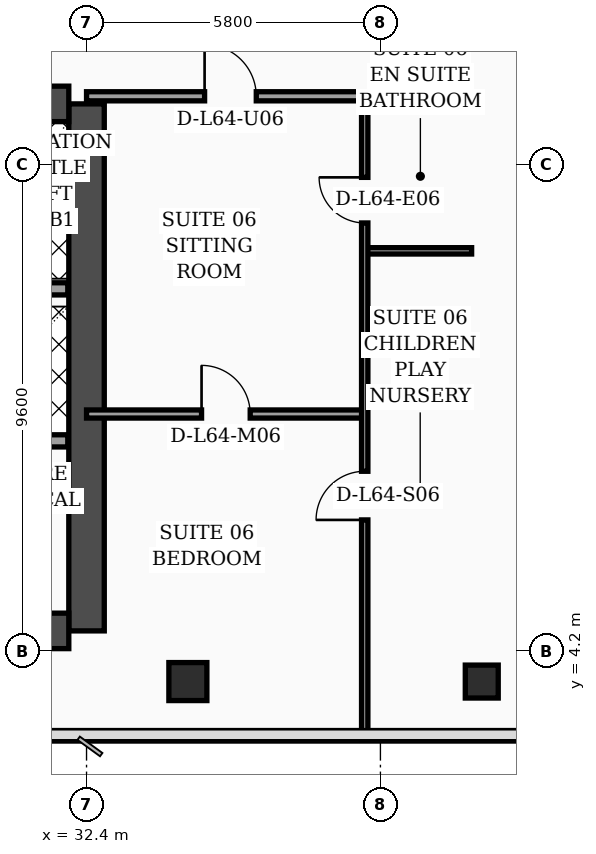
"""IFC4 building model, lengths in metres.
Left out: names, types, materials, properties, quantities, classifications, styles, units other than length and angle.
Written with IfcOpenShell. Run it as: python <this file> out.ifc"""

import sys

from ifc_helpers import new_model, si_unit, direction, frame, frame_2d, origin, origin_2d, place, context, subcontext, project, spatial, rectangle, hollow_rectangle, extrude, element, fill, save


model = new_model("IFC4")
c1 = context("Model", 3, precision=1e-05, world=origin(), true_north=direction((0.0, 1.0)))
c2 = subcontext(c1, "Body", "Model", "MODEL_VIEW")
j1 = project(units=[si_unit("LENGTHUNIT", "METRE"), si_unit("PLANEANGLEUNIT", "RADIAN")], contexts=[c1])
p1 = place(None, origin())
s1 = spatial("IfcSite", under=j1, at=p1, CompositionType="ELEMENT")
p2 = place(p1, origin())
s2 = spatial("IfcBuilding", under=s1, at=p2, CompositionType="ELEMENT")
p3 = place(p2, frame((0.0, 0.0, 259.0)))
s3 = spatial("IfcBuildingStorey", under=s2, at=p3, CompositionType="ELEMENT", Elevation=259.0)
p4 = place(p3, frame((32.4, 4.6, 0.0), z_axis=(0.0, 0.0, 1.0), x_axis=(0.0, 1.0, 0.0)))
e1 = element("IfcWall", 1, at=p4, inside=s3, PredefinedType="SHEAR", context=c2, shape_type="SweptSolid", body=[
    extrude(rectangle(XDim=10.4, YDim=0.7, at=frame_2d((5.2, 0.0))), origin(), (0.0, 0.0, 1.0), 4.05),
])
p5 = place(p3, frame((21.95, 15.0, 0.0), z_axis=(0.0, 0.0, 1.0), x_axis=(1.0, 0.0, 0.0)))
e2 = element("IfcWall", 2, at=p5, inside=s3, PredefinedType="SHEAR", context=c2, shape_type="SweptSolid", body=[
    extrude(rectangle(XDim=10.1, YDim=0.7, at=frame_2d((5.05, 0.0))), origin(), (0.0, 0.0, 1.0), 4.05),
])
p6 = place(p5, frame((4.95, 0.0, 0.0)))
e3 = element("IfcOpeningElement", 3, at=p6, cuts=e2, PredefinedType="OPENING", context=c2, shape_type="SweptSolid", body=[
    extrude(rectangle(XDim=1.1, YDim=2.2, at=frame_2d((0.55, 1.1))), frame((0.0, 0.36, 0.0), z_axis=(0.0, -1.0, 0.0), x_axis=(1.0, 0.0, 0.0)), (0.0, 0.0, 1.0), 0.72),
])
p7 = place(p3, frame((21.95, 4.6, 0.0), z_axis=(0.0, 0.0, 1.0), x_axis=(1.0, 0.0, 0.0)))
e4 = element("IfcWall", 4, at=p7, inside=s3, PredefinedType="SHEAR", context=c2, shape_type="SweptSolid", body=[
    extrude(rectangle(XDim=10.1, YDim=0.7, at=frame_2d((5.05, 0.0))), origin(), (0.0, 0.0, 1.0), 4.05),
])
p8 = place(p3, frame((34.4, 3.6, 0.0), z_axis=(0.0, 0.0, 1.0), x_axis=(1.0, 0.0, 0.0)))
e5 = element("IfcColumn", 5, at=p8, inside=s3, PredefinedType="COLUMN", context=c2, shape_type="SweptSolid", body=[
    extrude(hollow_rectangle(XDim=0.75, YDim=0.75, WallThickness=0.032, at=origin_2d()), origin(), (0.0, 0.0, 1.0), 4.05),
])
p9 = place(p3, frame((40.2, 3.6, 0.0), z_axis=(0.0, 0.0, 1.0), x_axis=(1.0, 0.0, 0.0)))
e6 = element("IfcColumn", 6, at=p9, inside=s3, PredefinedType="COLUMN", context=c2, shape_type="SweptSolid", body=[
    extrude(hollow_rectangle(XDim=0.65, YDim=0.65, WallThickness=0.028, at=origin_2d()), origin(), (0.0, 0.0, 1.0), 4.05),
])
p10 = place(p3, frame((46.63, 5.505, 0.0), z_axis=(0.0, 0.0, 1.0), x_axis=(-0.300501856448, 0.953781229775, 0.0)))
e7 = element("IfcWall", 7, at=p10, inside=s3, PredefinedType="SOLIDWALL", context=c2, shape_type="SweptSolid", body=[
    extrude(rectangle(XDim=30.814, YDim=0.32, at=frame_2d((15.407, 0.0))), origin(), (0.0, 0.0, 1.0), 4.05),
])
p11 = place(p10, frame((18.796, 0.0, 0.0)))
e8 = element("IfcOpeningElement", 8, at=p11, cuts=e7, PredefinedType="OPENING", context=c2, shape_type="SweptSolid", body=[
    extrude(rectangle(XDim=1.4, YDim=2.25, at=frame_2d((0.7, 1.125))), frame((0.0, 0.17, 0.0), z_axis=(0.0, -1.0, 0.0), x_axis=(1.0, 0.0, 0.0)), (0.0, 0.0, 1.0), 0.34),
])
p12 = place(p10, frame((4.437, 0.0, 0.7)))
e9 = element("IfcOpeningElement", 9, at=p12, cuts=e7, PredefinedType="OPENING", context=c2, shape_type="SweptSolid", body=[
    extrude(rectangle(XDim=1.6, YDim=1.65, at=frame_2d((0.8, 0.825))), frame((0.0, 0.17, 0.0), z_axis=(0.0, -1.0, 0.0), x_axis=(1.0, 0.0, 0.0)), (0.0, 0.0, 1.0), 0.34),
])
p13 = place(p10, frame((9.889, 0.0, 0.7)))
e10 = element("IfcOpeningElement", 10, at=p13, cuts=e7, PredefinedType="OPENING", context=c2, shape_type="SweptSolid", body=[
    extrude(rectangle(XDim=1.6, YDim=1.65, at=frame_2d((0.8, 0.825))), frame((0.0, 0.17, 0.0), z_axis=(0.0, -1.0, 0.0), x_axis=(1.0, 0.0, 0.0)), (0.0, 0.0, 1.0), 0.34),
])
p14 = place(p10, frame((1.6, 0.0, 0.75)))
e11 = element("IfcOpeningElement", 11, at=p14, cuts=e7, PredefinedType="OPENING", context=c2, shape_type="SweptSolid", body=[
    extrude(rectangle(XDim=1.5, YDim=1.6, at=frame_2d((0.75, 0.8))), frame((0.0, 0.17, 0.0), z_axis=(0.0, -1.0, 0.0), x_axis=(1.0, 0.0, 0.0)), (0.0, 0.0, 1.0), 0.34),
])
p15 = place(p10, frame((7.8, 0.0, 0.75)))
e12 = element("IfcOpeningElement", 12, at=p15, cuts=e7, PredefinedType="OPENING", context=c2, shape_type="SweptSolid", body=[
    extrude(rectangle(XDim=1.5, YDim=1.6, at=frame_2d((0.75, 0.8))), frame((0.0, 0.17, 0.0), z_axis=(0.0, -1.0, 0.0), x_axis=(1.0, 0.0, 0.0)), (0.0, 0.0, 1.0), 0.34),
])
p16 = place(p10, frame((11.95, 0.0, 0.75)))
e13 = element("IfcOpeningElement", 13, at=p16, cuts=e7, PredefinedType="OPENING", context=c2, shape_type="SweptSolid", body=[
    extrude(rectangle(XDim=1.5, YDim=1.6, at=frame_2d((0.75, 0.8))), frame((0.0, 0.17, 0.0), z_axis=(0.0, -1.0, 0.0), x_axis=(1.0, 0.0, 0.0)), (0.0, 0.0, 1.0), 0.34),
])
p17 = place(p10, frame((14.0, 0.0, 0.75)))
e14 = element("IfcOpeningElement", 14, at=p17, cuts=e7, PredefinedType="OPENING", context=c2, shape_type="SweptSolid", body=[
    extrude(rectangle(XDim=1.5, YDim=1.6, at=frame_2d((0.75, 0.8))), frame((0.0, 0.17, 0.0), z_axis=(0.0, -1.0, 0.0), x_axis=(1.0, 0.0, 0.0)), (0.0, 0.0, 1.0), 0.34),
])
p18 = place(p10, frame((16.55, 0.0, 0.75)))
e15 = element("IfcOpeningElement", 15, at=p18, cuts=e7, PredefinedType="OPENING", context=c2, shape_type="SweptSolid", body=[
    extrude(rectangle(XDim=1.5, YDim=1.6, at=frame_2d((0.75, 0.8))), frame((0.0, 0.17, 0.0), z_axis=(0.0, -1.0, 0.0), x_axis=(1.0, 0.0, 0.0)), (0.0, 0.0, 1.0), 0.34),
])
p19 = place(p10, frame((20.75, 0.0, 0.75)))
e16 = element("IfcOpeningElement", 16, at=p19, cuts=e7, PredefinedType="OPENING", context=c2, shape_type="SweptSolid", body=[
    extrude(rectangle(XDim=1.5, YDim=1.6, at=frame_2d((0.75, 0.8))), frame((0.0, 0.17, 0.0), z_axis=(0.0, -1.0, 0.0), x_axis=(1.0, 0.0, 0.0)), (0.0, 0.0, 1.0), 0.34),
])
p20 = place(p10, frame((23.3, 0.0, 0.75)))
e17 = element("IfcOpeningElement", 17, at=p20, cuts=e7, PredefinedType="OPENING", context=c2, shape_type="SweptSolid", body=[
    extrude(rectangle(XDim=1.5, YDim=1.6, at=frame_2d((0.75, 0.8))), frame((0.0, 0.17, 0.0), z_axis=(0.0, -1.0, 0.0), x_axis=(1.0, 0.0, 0.0)), (0.0, 0.0, 1.0), 0.34),
])
p21 = place(p10, frame((26.4, 0.0, 0.75)))
e18 = element("IfcOpeningElement", 18, at=p21, cuts=e7, PredefinedType="OPENING", context=c2, shape_type="SweptSolid", body=[
    extrude(rectangle(XDim=1.5, YDim=1.6, at=frame_2d((0.75, 0.8))), frame((0.0, 0.17, 0.0), z_axis=(0.0, -1.0, 0.0), x_axis=(1.0, 0.0, 0.0)), (0.0, 0.0, 1.0), 0.34),
])
p22 = place(p3, frame((27.02, 11.35, 0.0), z_axis=(0.0, 0.0, 1.0), x_axis=(1.0, 0.0, 0.0)))
e19 = element("IfcWall", 19, at=p22, inside=s3, PredefinedType="SOLIDWALL", context=c2, shape_type="SweptSolid", body=[
    extrude(rectangle(XDim=5.01, YDim=0.24, at=frame_2d((2.505, 0.0))), origin(), (0.0, 0.0, 1.0), 4.05),
])
p23 = place(p22, frame((0.45, 0.0, 0.0)))
e20 = element("IfcOpeningElement", 20, at=p23, cuts=e19, PredefinedType="OPENING", context=c2, shape_type="SweptSolid", body=[
    extrude(rectangle(XDim=1.3, YDim=2.35, at=frame_2d((0.65, 1.175))), frame((0.0, 0.13, 0.0), z_axis=(0.0, -1.0, 0.0), x_axis=(1.0, 0.0, 0.0)), (0.0, 0.0, 1.0), 0.26),
])
p24 = place(p3, frame((27.02, 8.35, 0.0), z_axis=(0.0, 0.0, 1.0), x_axis=(1.0, 0.0, 0.0)))
e21 = element("IfcWall", 21, at=p24, inside=s3, PredefinedType="SOLIDWALL", context=c2, shape_type="SweptSolid", body=[
    extrude(rectangle(XDim=5.01, YDim=0.24, at=frame_2d((2.505, 0.0))), origin(), (0.0, 0.0, 1.0), 4.05),
])
p25 = place(p3, frame((37.89, 12.1, 0.0), z_axis=(0.0, 0.0, 1.0), x_axis=(1.0, 0.0, 0.0)))
e22 = element("IfcWall", 22, at=p25, inside=s3, PredefinedType="PARTITIONING", context=c2, shape_type="SweptSolid", body=[
    extrude(rectangle(XDim=2.11, YDim=0.125, at=frame_2d((1.055, 0.0))), origin(), (0.0, 0.0, 1.0), 4.05),
])
p26 = place(p3, frame((32.4, 8.88, 0.0), z_axis=(0.0, 0.0, 1.0), x_axis=(1.0, 0.0, 0.0)))
e23 = element("IfcWall", 23, at=p26, inside=s3, PredefinedType="PARTITIONING", context=c2, shape_type="SweptSolid", body=[
    extrude(rectangle(XDim=5.49, YDim=0.16, at=frame_2d((2.745, 0.0))), origin(), (0.0, 0.0, 1.0), 3.5),
])
p27 = place(p26, frame((2.27, 0.0, 0.0)))
e24 = element("IfcOpeningElement", 24, at=p27, cuts=e23, PredefinedType="OPENING", context=c2, shape_type="SweptSolid", body=[
    extrude(rectangle(XDim=0.96, YDim=2.2, at=frame_2d((0.48, 1.1))), frame((0.0, 0.09, 0.0), z_axis=(0.0, -1.0, 0.0), x_axis=(1.0, 0.0, 0.0)), (0.0, 0.0, 1.0), 0.18),
])
p28 = place(p3, frame((37.89, 2.44, 0.0), z_axis=(0.0, 0.0, 1.0), x_axis=(0.0, 1.0, 0.0)))
e25 = element("IfcWall", 25, at=p28, inside=s3, PredefinedType="PARTITIONING", context=c2, shape_type="SweptSolid", body=[
    extrude(rectangle(XDim=12.71, YDim=0.125, at=frame_2d((6.355, 0.0))), origin(), (0.0, 0.0, 1.0), 2.35),
])
p29 = place(p28, frame((4.35, 0.0, 0.0)))
e26 = element("IfcOpeningElement", 26, at=p29, cuts=e25, PredefinedType="OPENING", context=c2, shape_type="SweptSolid", body=[
    extrude(rectangle(XDim=0.96, YDim=2.2, at=frame_2d((0.48, 1.1))), frame((0.0, 0.073, 0.0), z_axis=(0.0, -1.0, 0.0), x_axis=(1.0, 0.0, 0.0)), (0.0, 0.0, 1.0), 0.145),
])
p30 = place(p28, frame((10.21, 0.0, 0.0)))
e27 = element("IfcOpeningElement", 27, at=p30, cuts=e25, PredefinedType="OPENING", context=c2, shape_type="SweptSolid", body=[
    extrude(rectangle(XDim=0.9, YDim=2.15, at=frame_2d((0.45, 1.075))), frame((0.0, 0.073, 0.0), z_axis=(0.0, -1.0, 0.0), x_axis=(1.0, 0.0, 0.0)), (0.0, 0.0, 1.0), 0.145),
])
p31 = place(p3, frame((32.4, 15.15, 0.0), z_axis=(0.0, 0.0, 1.0), x_axis=(1.0, 0.0, 0.0)))
e28 = element("IfcWall", 28, at=p31, inside=s3, PredefinedType="PARTITIONING", context=c2, shape_type="SweptSolid", body=[
    extrude(rectangle(XDim=7.6, YDim=0.18, at=frame_2d((3.8, 0.0))), origin(), (0.0, 0.0, 1.0), 2.35),
])
p32 = place(p31, frame((2.33, 0.0, 0.0)))
e29 = element("IfcOpeningElement", 29, at=p32, cuts=e28, PredefinedType="OPENING", context=c2, shape_type="SweptSolid", body=[
    extrude(rectangle(XDim=1.02, YDim=2.2, at=frame_2d((0.51, 1.1))), frame((0.0, 0.1, 0.0), z_axis=(0.0, -1.0, 0.0), x_axis=(1.0, 0.0, 0.0)), (0.0, 0.0, 1.0), 0.2),
])
p33 = place(p27, origin())
e30 = element("IfcDoor", 30, at=p33, inside=s3, OperationType="SINGLE_SWING_LEFT", PredefinedType="DOOR", context=c2, shape_type="SweptSolid", body=[
    extrude(rectangle(XDim=0.96, YDim=2.2, at=frame_2d((0.48, 1.1))), frame((0.0, 0.025, 0.0), z_axis=(0.0, -1.0, 0.0), x_axis=(1.0, 0.0, 0.0)), (0.0, 0.0, 1.0), 0.05),
])
fill(e24, e30)
p34 = place(p29, origin())
e31 = element("IfcDoor", 31, at=p34, inside=s3, OperationType="SINGLE_SWING_LEFT", PredefinedType="DOOR", context=c2, shape_type="SweptSolid", body=[
    extrude(rectangle(XDim=0.96, YDim=2.2, at=frame_2d((0.48, 1.1))), frame((0.0, 0.025, 0.0), z_axis=(0.0, -1.0, 0.0), x_axis=(1.0, 0.0, 0.0)), (0.0, 0.0, 1.0), 0.05),
])
fill(e26, e31)
p35 = place(p30, origin())
e32 = element("IfcDoor", 32, at=p35, inside=s3, OperationType="SINGLE_SWING_RIGHT", PredefinedType="DOOR", context=c2, shape_type="SweptSolid", body=[
    extrude(rectangle(XDim=0.9, YDim=2.15, at=frame_2d((0.45, 1.075))), frame((0.0, 0.025, 0.0), z_axis=(0.0, -1.0, 0.0), x_axis=(1.0, 0.0, 0.0)), (0.0, 0.0, 1.0), 0.05),
])
fill(e27, e32)
p36 = place(p32, origin())
e33 = element("IfcDoor", 33, at=p36, inside=s3, OperationType="SINGLE_SWING_LEFT", PredefinedType="DOOR", context=c2, shape_type="SweptSolid", body=[
    extrude(rectangle(XDim=1.02, YDim=2.2, at=frame_2d((0.51, 1.1))), frame((0.0, 0.025, 0.0), z_axis=(0.0, -1.0, 0.0), x_axis=(1.0, 0.0, 0.0)), (0.0, 0.0, 1.0), 0.05),
])
fill(e29, e33)
save(model, sys.argv[1])
